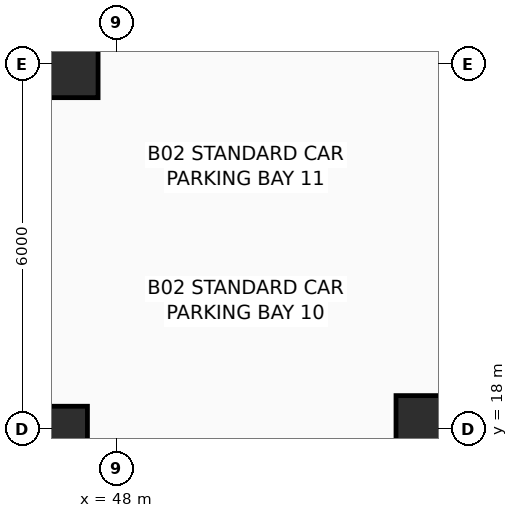
"""IFC4 building model, lengths in metres.
Left out: names, types, materials, properties, quantities, classifications, styles, units other than length and angle.
Written with IfcOpenShell. Run it as: python <this file> out.ifc"""

import sys

from ifc_helpers import new_model, si_unit, direction, frame, origin, origin_2d, place, context, subcontext, project, spatial, rectangle, hollow_rectangle, extrude, element, save


model = new_model("IFC4")
c1 = context("Model", 3, precision=1e-05, world=origin(), true_north=direction((0.0, 1.0)))
c2 = subcontext(c1, "Body", "Model", "MODEL_VIEW")
j1 = project(units=[si_unit("LENGTHUNIT", "METRE"), si_unit("PLANEANGLEUNIT", "RADIAN")], contexts=[c1])
p1 = place(None, origin())
s1 = spatial("IfcSite", under=j1, at=p1, CompositionType="ELEMENT")
p2 = place(p1, origin())
s2 = spatial("IfcBuilding", under=s1, at=p2, CompositionType="ELEMENT")
p3 = place(p2, frame((0.0, 0.0, -9.6)))
s3 = spatial("IfcBuildingStorey", under=s2, at=p3, CompositionType="ELEMENT", Elevation=-9.6)
p4 = place(p3, frame((47.15, 18.0, 0.0), z_axis=(0.0, 0.0, 1.0), x_axis=(1.0, 0.0, 0.0)))
e1 = element("IfcColumn", 1, at=p4, inside=s3, PredefinedType="COLUMN", context=c2, shape_type="SweptSolid", body=[
    extrude(hollow_rectangle(XDim=0.75, YDim=0.75, WallThickness=0.035, InnerFilletRadius=0.035, OuterFilletRadius=0.05, at=origin_2d()), origin(), (0.0, 0.0, 1.0), 4.8),
])
for number, where, z_axis, x_axis in (
    (2, (47.15, 24.0, 0.0), (0.0, 0.0, 1.0), (1.0, 0.0, 0.0)),
    (3, (53.15, 18.0, 0.0), (0.0, 0.0, 1.0), (1.0, 0.0, 0.0)),
):
    element("IfcColumn", number, at=place(p3, frame(where, z_axis=z_axis, x_axis=x_axis)), inside=s3, PredefinedType="COLUMN", context=c2, shape_type="SweptSolid", body=[
        extrude(rectangle(XDim=1.1, YDim=1.1, at=origin_2d()), origin(), (0.0, 0.0, 1.0), 4.8),
    ])
save(model, sys.argv[1])
